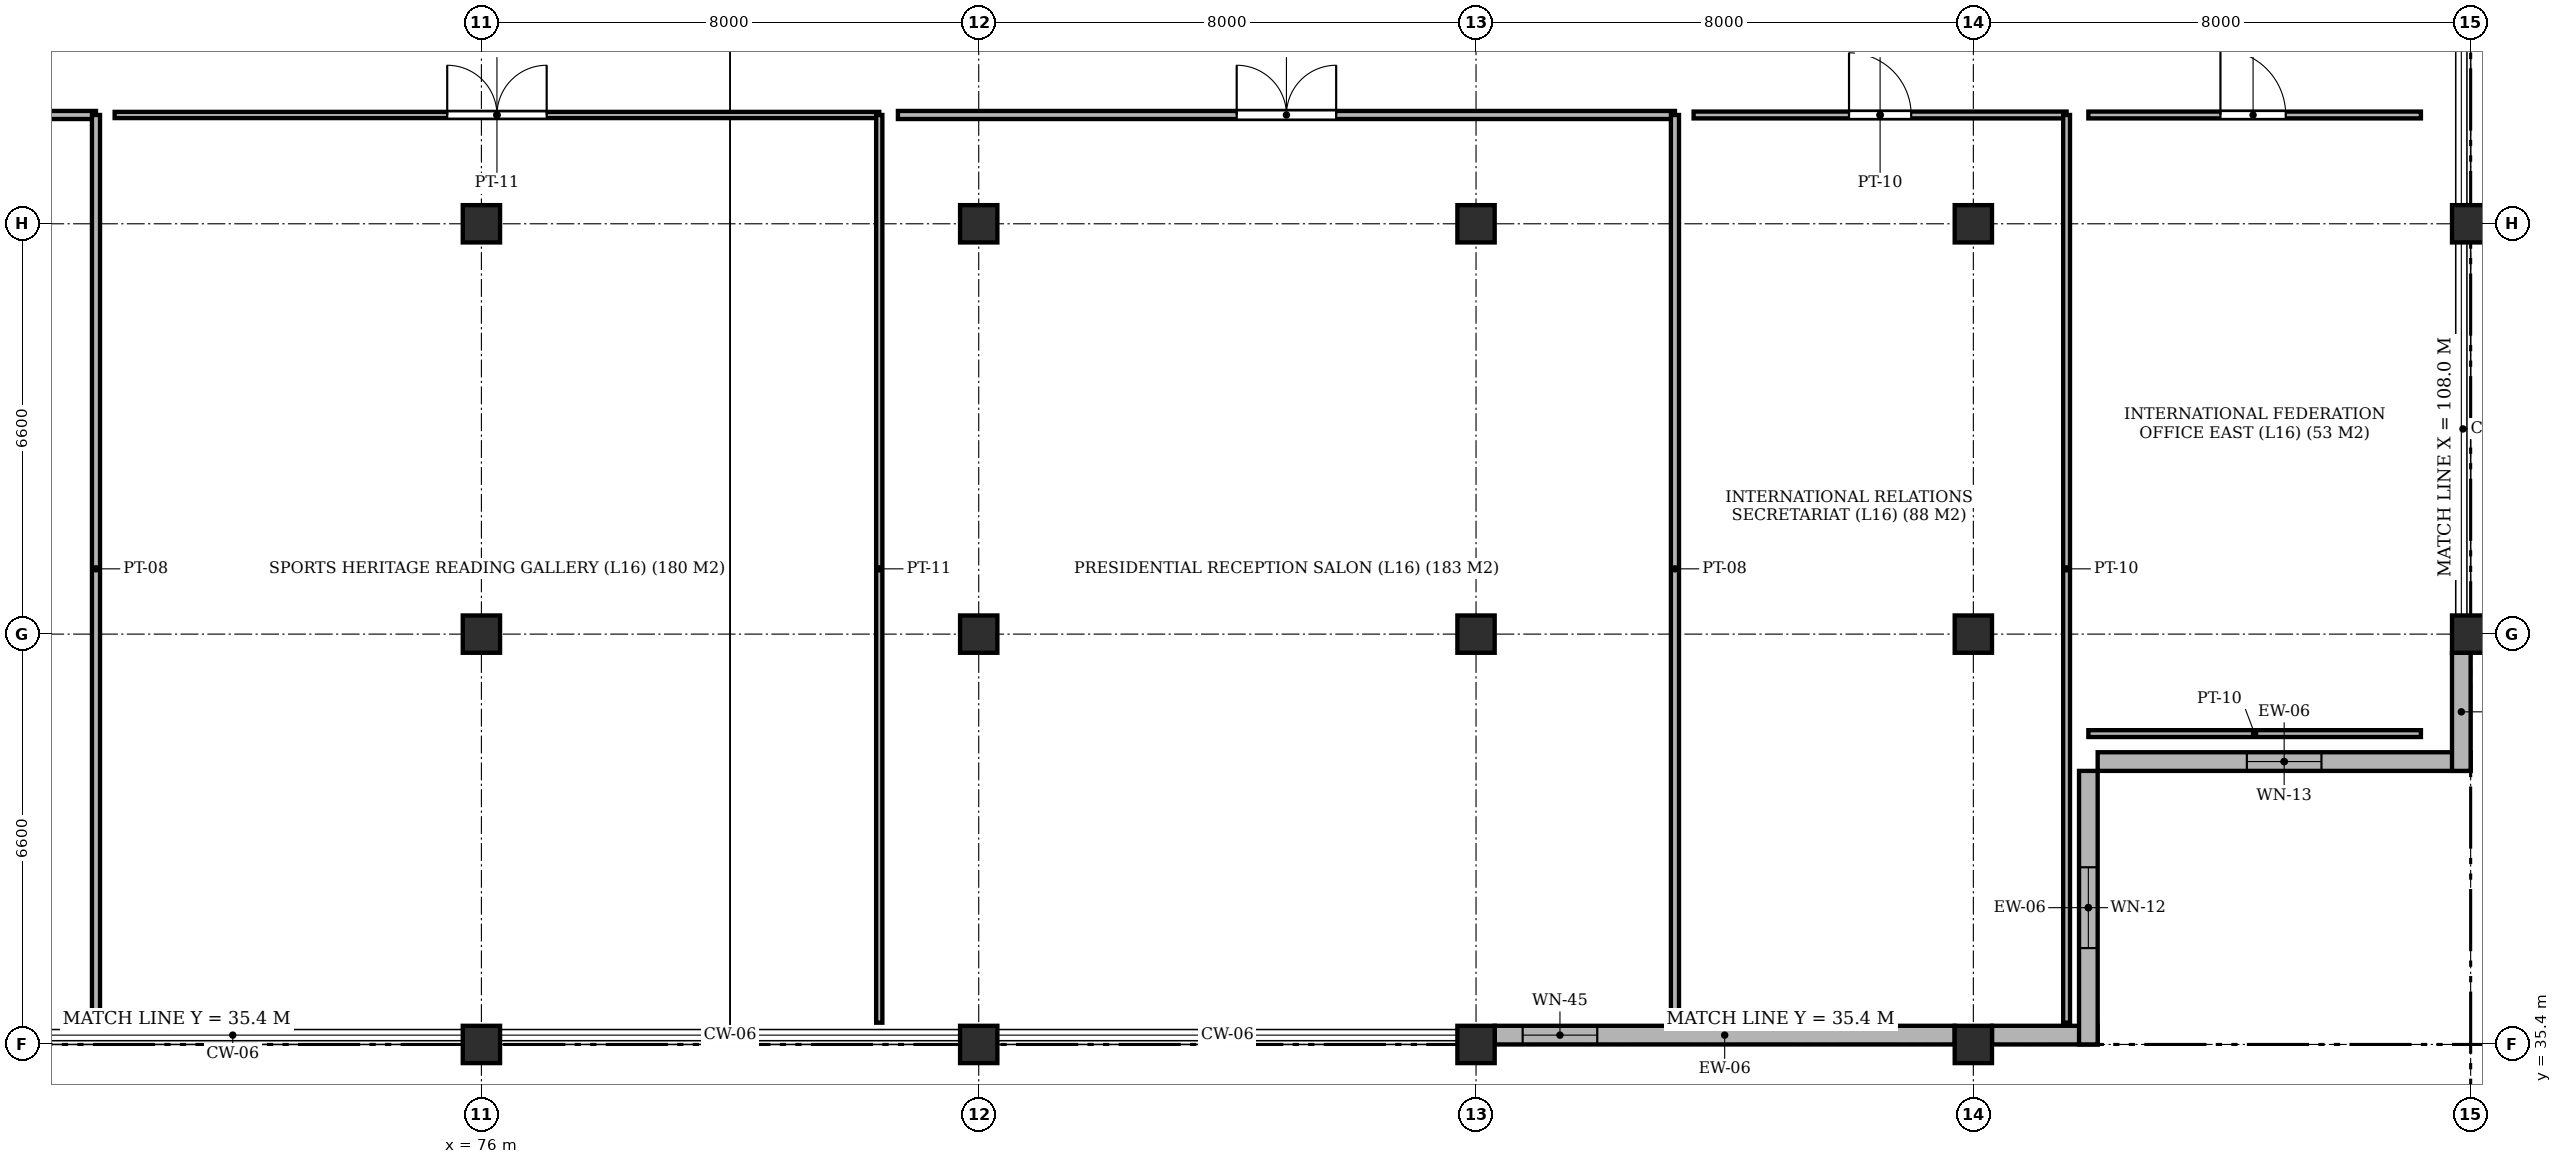
"""IFC4 building model, lengths in metres.
Left out: names, types, materials, properties, quantities, classifications, styles, units other than length and angle.
Written with IfcOpenShell. Run it as: python <this file> out.ifc"""

import sys

from ifc_helpers import new_model, si_unit, direction, frame, frame_2d, origin, origin_2d, place, context, subcontext, project, spatial, rectangle, extrude, element, fill, save


model = new_model("IFC4")
c1 = context("Model", 3, precision=1e-05, world=origin(), true_north=direction((0.0, 1.0)))
c2 = subcontext(c1, "Body", "Model", "MODEL_VIEW")
j1 = project(units=[si_unit("LENGTHUNIT", "METRE"), si_unit("PLANEANGLEUNIT", "RADIAN")], contexts=[c1])
p1 = place(None, origin())
s1 = spatial("IfcSite", under=j1, at=p1, CompositionType="ELEMENT")
p2 = place(p1, origin())
s2 = spatial("IfcBuilding", under=s1, at=p2, CompositionType="ELEMENT")
p3 = place(p2, frame((0.0, 0.0, 63.3)))
s3 = spatial("IfcBuildingStorey", under=s2, at=p3, CompositionType="ELEMENT", Elevation=63.3)
for number, where, z_axis, x_axis in (
    (1, (76.0, 35.4, -0.21), (0.0, 0.0, 1.0), (1.0, 0.0, 0.0)),
    (2, (76.0, 42.0, -0.21), (0.0, 0.0, 1.0), (1.0, 0.0, 0.0)),
    (3, (76.0, 48.6, -0.21), (0.0, 0.0, 1.0), (1.0, 0.0, 0.0)),
    (4, (84.0, 35.4, -0.21), (0.0, 0.0, 1.0), (1.0, 0.0, 0.0)),
    (5, (84.0, 42.0, -0.21), (0.0, 0.0, 1.0), (1.0, 0.0, 0.0)),
    (6, (84.0, 48.6, -0.21), (0.0, 0.0, 1.0), (1.0, 0.0, 0.0)),
    (7, (92.0, 35.4, -0.21), (0.0, 0.0, 1.0), (1.0, 0.0, 0.0)),
    (8, (92.0, 42.0, -0.21), (0.0, 0.0, 1.0), (1.0, 0.0, 0.0)),
    (9, (92.0, 48.6, -0.21), (0.0, 0.0, 1.0), (1.0, 0.0, 0.0)),
    (10, (100.0, 35.4, -0.21), (0.0, 0.0, 1.0), (1.0, 0.0, 0.0)),
    (11, (100.0, 42.0, -0.21), (0.0, 0.0, 1.0), (1.0, 0.0, 0.0)),
    (12, (100.0, 48.6, -0.21), (0.0, 0.0, 1.0), (1.0, 0.0, 0.0)),
    (13, (108.0, 42.0, -0.21), (0.0, 0.0, 1.0), (1.0, 0.0, 0.0)),
    (14, (108.0, 48.6, -0.21), (0.0, 0.0, 1.0), (1.0, 0.0, 0.0)),
):
    element("IfcColumn", number, at=place(p3, frame(where, z_axis=z_axis, x_axis=x_axis)), inside=s3, PredefinedType="COLUMN", context=c2, shape_type="SweptSolid", body=[
        extrude(rectangle(XDim=0.6, YDim=0.6, at=origin_2d()), origin(), (0.0, 0.0, 1.0), 3.22),
    ])
p4 = place(p3, frame((92.3, 35.55, 0.0), z_axis=(0.0, 0.0, 1.0), x_axis=(1.0, 0.0, 0.0)))
e15 = element("IfcWall", 15, at=p4, inside=s3, PredefinedType="SOLIDWALL", context=c2, shape_type="SweptSolid", body=[
    extrude(rectangle(XDim=7.4, YDim=0.3, at=frame_2d((3.7, 0.0))), origin(), (0.0, 0.0, 1.0), 2.53),
])
p5 = place(p4, frame((0.45, 0.0, 0.62)))
e16 = element("IfcOpeningElement", 16, at=p5, cuts=e15, PredefinedType="OPENING", context=c2, shape_type="SweptSolid", body=[
    extrude(rectangle(XDim=1.2, YDim=1.65, at=frame_2d((0.6, 0.825))), frame((0.0, 0.162, 0.0), z_axis=(0.0, -1.0, 0.0), x_axis=(1.0, 0.0, 0.0)), (0.0, 0.0, 1.0), 0.324),
])
p6 = place(p3, frame((100.3, 35.55, 0.0), z_axis=(0.0, 0.0, 1.0), x_axis=(1.0, 0.0, 0.0)))
e17 = element("IfcWall", 17, at=p6, inside=s3, PredefinedType="SOLIDWALL", context=c2, shape_type="SweptSolid", body=[
    extrude(rectangle(XDim=1.7, YDim=0.3, at=frame_2d((0.85, 0.0))), origin(), (0.0, 0.0, 1.0), 2.53),
])
p7 = place(p3, frame((101.85, 35.4, 0.0), z_axis=(0.0, 0.0, 1.0), x_axis=(0.0, 1.0, 0.0)))
e18 = element("IfcWall", 18, at=p7, inside=s3, PredefinedType="SOLIDWALL", context=c2, shape_type="SweptSolid", body=[
    extrude(rectangle(XDim=4.4, YDim=0.3, at=frame_2d((2.2, 0.0))), origin(), (0.0, 0.0, 1.0), 2.53),
])
p8 = place(p7, frame((1.55, 0.0, 0.62)))
e19 = element("IfcOpeningElement", 19, at=p8, cuts=e18, PredefinedType="OPENING", context=c2, shape_type="SweptSolid", body=[
    extrude(rectangle(XDim=1.3, YDim=1.8, at=frame_2d((0.65, 0.9))), frame((0.0, 0.162, 0.0), z_axis=(0.0, -1.0, 0.0), x_axis=(1.0, 0.0, 0.0)), (0.0, 0.0, 1.0), 0.324),
])
p9 = place(p3, frame((102.0, 39.95, 0.0), z_axis=(0.0, 0.0, 1.0), x_axis=(1.0, 0.0, 0.0)))
e20 = element("IfcWall", 20, at=p9, inside=s3, PredefinedType="SOLIDWALL", context=c2, shape_type="SweptSolid", body=[
    extrude(rectangle(XDim=6.0, YDim=0.3, at=frame_2d((3.0, 0.0))), origin(), (0.0, 0.0, 1.0), 2.53),
])
p10 = place(p9, frame((2.4, 0.0, 0.62)))
e21 = element("IfcOpeningElement", 21, at=p10, cuts=e20, PredefinedType="OPENING", context=c2, shape_type="SweptSolid", body=[
    extrude(rectangle(XDim=1.2, YDim=1.7, at=frame_2d((0.6, 0.85))), frame((0.0, 0.162, 0.0), z_axis=(0.0, -1.0, 0.0), x_axis=(1.0, 0.0, 0.0)), (0.0, 0.0, 1.0), 0.324),
])
p11 = place(p3, frame((107.85, 39.8, 0.0), z_axis=(0.0, 0.0, 1.0), x_axis=(0.0, 1.0, 0.0)))
e22 = element("IfcWall", 22, at=p11, inside=s3, PredefinedType="SOLIDWALL", context=c2, shape_type="SweptSolid", body=[
    extrude(rectangle(XDim=1.9, YDim=0.3, at=frame_2d((0.95, 0.0))), origin(), (0.0, 0.0, 1.0), 2.53),
])
p12 = place(p3, frame((59.0, 50.35, 0.0), z_axis=(0.0, 0.0, 1.0), x_axis=(1.0, 0.0, 0.0)))
e23 = element("IfcWall", 23, at=p12, inside=s3, PredefinedType="PARTITIONING", context=c2, shape_type="SweptSolid", body=[
    extrude(rectangle(XDim=10.8, YDim=0.13, at=frame_2d((5.4, 0.0))), origin(), (0.0, 0.0, 1.0), 2.53),
])
p13 = place(p12, frame((4.875, 0.0, 0.0)))
e24 = element("IfcOpeningElement", 24, at=p13, cuts=e23, PredefinedType="OPENING", context=c2, shape_type="SweptSolid", body=[
    extrude(rectangle(XDim=1.05, YDim=2.15, at=frame_2d((0.525, 1.075))), frame((0.0, 0.077, 0.0), z_axis=(0.0, -1.0, 0.0), x_axis=(1.0, 0.0, 0.0)), (0.0, 0.0, 1.0), 0.154),
])
p14 = place(p3, frame((69.8, 35.75, 0.0), z_axis=(0.0, 0.0, 1.0), x_axis=(0.0, 1.0, 0.0)))
e25 = element("IfcWall", 25, at=p14, inside=s3, PredefinedType="PARTITIONING", context=c2, shape_type="SweptSolid", body=[
    extrude(rectangle(XDim=14.6, YDim=0.13, at=frame_2d((7.3, 0.0))), origin(), (0.0, 0.0, 1.0), 2.53),
])
p15 = place(p3, frame((70.1, 50.35, 0.0), z_axis=(0.0, 0.0, 1.0), x_axis=(1.0, 0.0, 0.0)))
e26 = element("IfcWall", 26, at=p15, inside=s3, PredefinedType="PARTITIONING", context=c2, shape_type="SweptSolid", body=[
    extrude(rectangle(XDim=12.3, YDim=0.1, at=frame_2d((6.15, 0.0))), origin(), (0.0, 0.0, 1.0), 2.53),
])
p16 = place(p15, frame((5.35, 0.0, 0.0)))
e27 = element("IfcOpeningElement", 27, at=p16, cuts=e26, PredefinedType="OPENING", context=c2, shape_type="SweptSolid", body=[
    extrude(rectangle(XDim=1.6, YDim=2.2, at=frame_2d((0.8, 1.1))), frame((0.0, 0.062, 0.0), z_axis=(0.0, -1.0, 0.0), x_axis=(1.0, 0.0, 0.0)), (0.0, 0.0, 1.0), 0.124),
])
p17 = place(p3, frame((82.4, 35.75, 0.0), z_axis=(0.0, 0.0, 1.0), x_axis=(0.0, 1.0, 0.0)))
e28 = element("IfcWall", 28, at=p17, inside=s3, PredefinedType="PARTITIONING", context=c2, shape_type="SweptSolid", body=[
    extrude(rectangle(XDim=14.6, YDim=0.1, at=frame_2d((7.3, 0.0))), origin(), (0.0, 0.0, 1.0), 2.53),
])
p18 = place(p3, frame((82.7, 50.35, 0.0), z_axis=(0.0, 0.0, 1.0), x_axis=(1.0, 0.0, 0.0)))
e29 = element("IfcWall", 29, at=p18, inside=s3, PredefinedType="PARTITIONING", context=c2, shape_type="SweptSolid", body=[
    extrude(rectangle(XDim=12.5, YDim=0.13, at=frame_2d((6.25, 0.0))), origin(), (0.0, 0.0, 1.0), 2.53),
])
p19 = place(p18, frame((5.45, 0.0, 0.0)))
e30 = element("IfcOpeningElement", 30, at=p19, cuts=e29, PredefinedType="OPENING", context=c2, shape_type="SweptSolid", body=[
    extrude(rectangle(XDim=1.6, YDim=2.2, at=frame_2d((0.8, 1.1))), frame((0.0, 0.077, 0.0), z_axis=(0.0, -1.0, 0.0), x_axis=(1.0, 0.0, 0.0)), (0.0, 0.0, 1.0), 0.154),
])
p20 = place(p3, frame((95.2, 35.75, 0.0), z_axis=(0.0, 0.0, 1.0), x_axis=(0.0, 1.0, 0.0)))
e31 = element("IfcWall", 31, at=p20, inside=s3, PredefinedType="PARTITIONING", context=c2, shape_type="SweptSolid", body=[
    extrude(rectangle(XDim=14.6, YDim=0.13, at=frame_2d((7.3, 0.0))), origin(), (0.0, 0.0, 1.0), 2.53),
])
p21 = place(p3, frame((95.5, 50.35, 0.0), z_axis=(0.0, 0.0, 1.0), x_axis=(1.0, 0.0, 0.0)))
e32 = element("IfcWall", 32, at=p21, inside=s3, PredefinedType="PARTITIONING", context=c2, shape_type="SweptSolid", body=[
    extrude(rectangle(XDim=6.0, YDim=0.11, at=frame_2d((3.0, 0.0))), origin(), (0.0, 0.0, 1.0), 2.53),
])
p22 = place(p21, frame((2.5, 0.0, 0.0)))
e33 = element("IfcOpeningElement", 33, at=p22, cuts=e32, PredefinedType="OPENING", context=c2, shape_type="SweptSolid", body=[
    extrude(rectangle(XDim=1.0, YDim=2.15, at=frame_2d((0.5, 1.075))), frame((0.0, 0.067, 0.0), z_axis=(0.0, -1.0, 0.0), x_axis=(1.0, 0.0, 0.0)), (0.0, 0.0, 1.0), 0.134),
])
p23 = place(p3, frame((101.5, 35.75, 0.0), z_axis=(0.0, 0.0, 1.0), x_axis=(0.0, 1.0, 0.0)))
e34 = element("IfcWall", 34, at=p23, inside=s3, PredefinedType="PARTITIONING", context=c2, shape_type="SweptSolid", body=[
    extrude(rectangle(XDim=14.6, YDim=0.11, at=frame_2d((7.3, 0.0))), origin(), (0.0, 0.0, 1.0), 2.53),
])
p24 = place(p3, frame((101.85, 40.4, 0.0), z_axis=(0.0, 0.0, 1.0), x_axis=(1.0, 0.0, 0.0)))
e35 = element("IfcWall", 35, at=p24, inside=s3, PredefinedType="PARTITIONING", context=c2, shape_type="SweptSolid", body=[
    extrude(rectangle(XDim=5.35, YDim=0.11, at=frame_2d((2.675, 0.0))), origin(), (0.0, 0.0, 1.0), 2.53),
])
p25 = place(p3, frame((101.85, 50.35, 0.0), z_axis=(0.0, 0.0, 1.0), x_axis=(1.0, 0.0, 0.0)))
e36 = element("IfcWall", 36, at=p25, inside=s3, PredefinedType="PARTITIONING", context=c2, shape_type="SweptSolid", body=[
    extrude(rectangle(XDim=5.35, YDim=0.11, at=frame_2d((2.675, 0.0))), origin(), (0.0, 0.0, 1.0), 2.53),
])
p26 = place(p25, frame((2.125, 0.0, 0.0)))
e37 = element("IfcOpeningElement", 37, at=p26, cuts=e36, PredefinedType="OPENING", context=c2, shape_type="SweptSolid", body=[
    extrude(rectangle(XDim=1.05, YDim=2.15, at=frame_2d((0.525, 1.075))), frame((0.0, 0.067, 0.0), z_axis=(0.0, -1.0, 0.0), x_axis=(1.0, 0.0, 0.0)), (0.0, 0.0, 1.0), 0.134),
])
p27 = place(p5, origin())
e38 = element("IfcWindow", 38, at=p27, inside=s3, PartitioningType="SINGLE_PANEL", PredefinedType="WINDOW", context=c2, shape_type="SweptSolid", body=[
    extrude(rectangle(XDim=1.2, YDim=1.65, at=frame_2d((0.6, 0.825))), frame((0.0, 0.03, 0.0), z_axis=(0.0, -1.0, 0.0), x_axis=(1.0, 0.0, 0.0)), (0.0, 0.0, 1.0), 0.06),
])
fill(e16, e38)
p28 = place(p8, origin())
e39 = element("IfcWindow", 39, at=p28, inside=s3, PartitioningType="SINGLE_PANEL", PredefinedType="WINDOW", context=c2, shape_type="SweptSolid", body=[
    extrude(rectangle(XDim=1.3, YDim=1.8, at=frame_2d((0.65, 0.9))), frame((0.0, 0.03, 0.0), z_axis=(0.0, -1.0, 0.0), x_axis=(1.0, 0.0, 0.0)), (0.0, 0.0, 1.0), 0.06),
])
fill(e19, e39)
p29 = place(p10, origin())
e40 = element("IfcWindow", 40, at=p29, inside=s3, PartitioningType="SINGLE_PANEL", PredefinedType="WINDOW", context=c2, shape_type="SweptSolid", body=[
    extrude(rectangle(XDim=1.2, YDim=1.7, at=frame_2d((0.6, 0.85))), frame((0.0, 0.03, 0.0), z_axis=(0.0, -1.0, 0.0), x_axis=(1.0, 0.0, 0.0)), (0.0, 0.0, 1.0), 0.06),
])
fill(e21, e40)
p30 = place(p16, origin())
e41 = element("IfcDoor", 41, at=p30, inside=s3, OperationType="DOUBLE_DOOR_SINGLE_SWING", PredefinedType="DOOR", context=c2, shape_type="SweptSolid", body=[
    extrude(rectangle(XDim=1.6, YDim=2.2, at=frame_2d((0.8, 1.1))), frame((0.0, 0.025, 0.0), z_axis=(0.0, -1.0, 0.0), x_axis=(1.0, 0.0, 0.0)), (0.0, 0.0, 1.0), 0.05),
])
fill(e27, e41)
p31 = place(p19, origin())
e42 = element("IfcDoor", 42, at=p31, inside=s3, OperationType="DOUBLE_DOOR_SINGLE_SWING", PredefinedType="DOOR", context=c2, shape_type="SweptSolid", body=[
    extrude(rectangle(XDim=1.6, YDim=2.2, at=frame_2d((0.8, 1.1))), frame((0.0, 0.025, 0.0), z_axis=(0.0, -1.0, 0.0), x_axis=(1.0, 0.0, 0.0)), (0.0, 0.0, 1.0), 0.05),
])
fill(e30, e42)
p32 = place(p22, origin())
e43 = element("IfcDoor", 43, at=p32, inside=s3, OperationType="SINGLE_SWING_LEFT", PredefinedType="DOOR", context=c2, shape_type="SweptSolid", body=[
    extrude(rectangle(XDim=1.0, YDim=2.15, at=frame_2d((0.5, 1.075))), frame((0.0, 0.025, 0.0), z_axis=(0.0, -1.0, 0.0), x_axis=(1.0, 0.0, 0.0)), (0.0, 0.0, 1.0), 0.05),
])
fill(e33, e43)
p33 = place(p26, origin())
e44 = element("IfcDoor", 44, at=p33, inside=s3, OperationType="SINGLE_SWING_LEFT", PredefinedType="DOOR", context=c2, shape_type="SweptSolid", body=[
    extrude(rectangle(XDim=1.05, YDim=2.15, at=frame_2d((0.525, 1.075))), frame((0.0, 0.025, 0.0), z_axis=(0.0, -1.0, 0.0), x_axis=(1.0, 0.0, 0.0)), (0.0, 0.0, 1.0), 0.05),
])
fill(e37, e44)
save(model, sys.argv[1])
